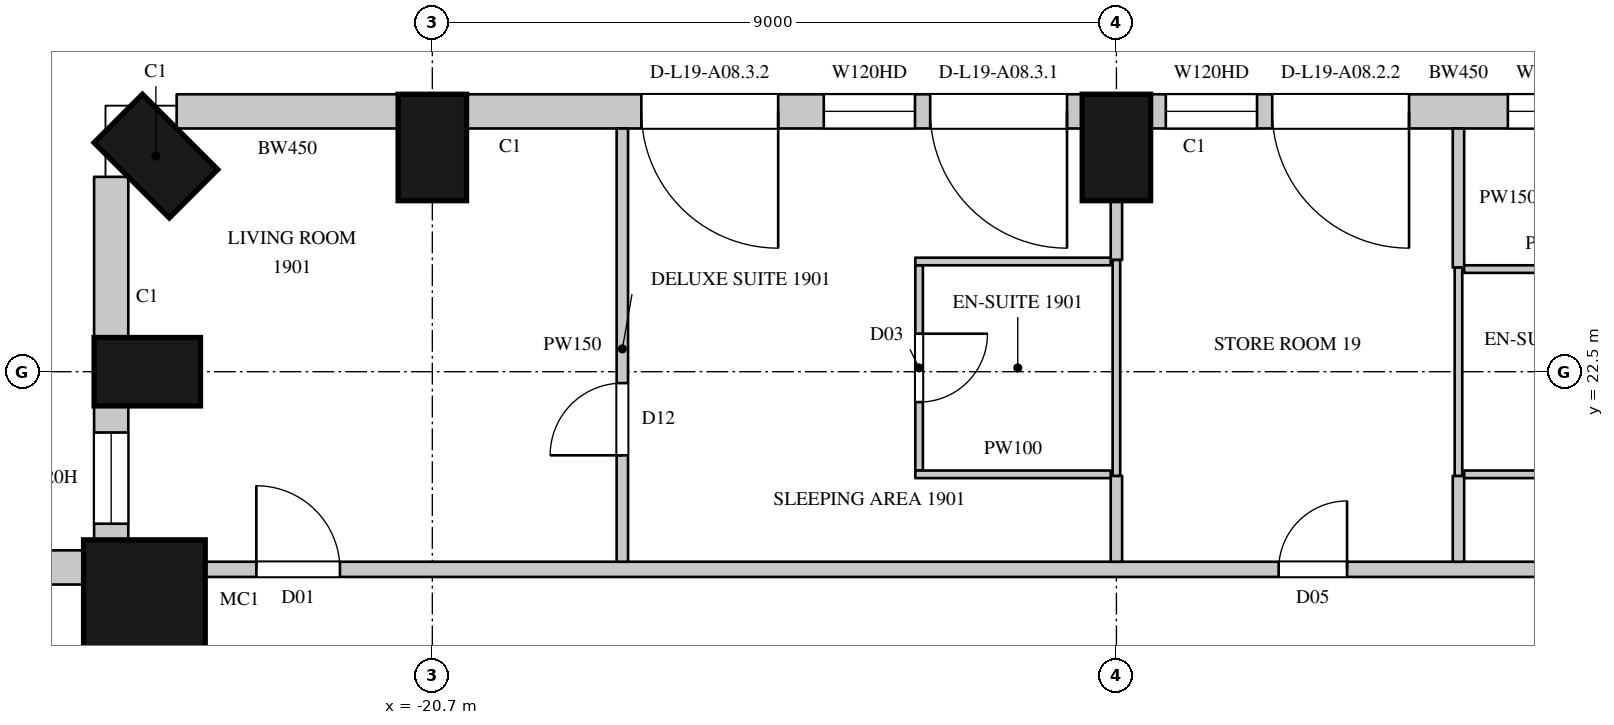
"""IFC4 building model, lengths in metres.
Left out: names, types, materials, properties, quantities, classifications, styles, units other than length and angle.
Written with IfcOpenShell. Run it as: python <this file> out.ifc"""

import sys

from ifc_helpers import new_model, si_unit, direction, frame, frame_2d, origin, origin_2d, place, context, subcontext, project, spatial, rectangle, circle, extrude, element, fill, save


model = new_model("IFC4")
c1 = context("Model", 3, precision=1e-05, world=origin(), true_north=direction((0.0, 1.0)))
c2 = subcontext(c1, "Body", "Model", "MODEL_VIEW")
j1 = project(units=[si_unit("LENGTHUNIT", "METRE"), si_unit("PLANEANGLEUNIT", "RADIAN")], contexts=[c1])
p1 = place(None, origin())
s1 = spatial("IfcSite", under=j1, at=p1, CompositionType="ELEMENT")
p2 = place(p1, origin())
s2 = spatial("IfcBuilding", under=s1, at=p2, CompositionType="ELEMENT")
p3 = place(p2, frame((0.0, 0.0, 98.7)))
s3 = spatial("IfcBuildingStorey", under=s2, at=p3, CompositionType="ELEMENT", Elevation=98.7)
for number, where, z_axis, x_axis in (
    (1, (-11.7, 25.45, 0.0), (0.0, 0.0, 1.0), (-1.0, 0.0, 0.0)),
    (2, (-20.7, 25.45, 0.0), (0.0, 0.0, 1.0), (-1.0, 0.0, 0.0)),
    (3, (-24.337, 25.337, 0.0), (0.0, 0.0, 1.0), (-0.707, -0.707, 0.0)),
    (4, (-24.45, 22.5, 0.0), (0.0, 0.0, 1.0), (0.0, -1.0, 0.0)),
):
    element("IfcColumn", number, at=place(p3, frame(where, z_axis=z_axis, x_axis=x_axis)), inside=s3, PredefinedType="COLUMN", context=c2, shape_type="SweptSolid", body=[
        extrude(rectangle(XDim=0.9, YDim=1.4, at=origin_2d()), origin(), (0.0, 0.0, 1.0), 3.6),
    ])
p4 = place(p3, frame((-24.488, 19.488, 0.0), z_axis=(0.0, 0.0, 1.0), x_axis=(1.0, 0.0, 0.0)))
e5 = element("IfcColumn", 5, at=p4, inside=s3, PredefinedType="COLUMN", context=c2, shape_type="SweptSolid", body=[
    extrude(circle(Radius=0.8, at=origin_2d()), origin(), (0.0, 0.0, 1.0), 3.6),
])
p5 = place(p3, frame((-3.15, 25.925, 0.0), z_axis=(0.0, 0.0, 1.0), x_axis=(-1.0, 0.0, 0.0)))
e6 = element("IfcWall", 6, at=p5, inside=s3, PredefinedType="SOLIDWALL", context=c2, shape_type="SweptSolid", body=[
    extrude(rectangle(XDim=8.1, YDim=0.45, at=frame_2d((4.05, 0.0))), origin(), (0.0, 0.0, 1.0), 3.3),
])
p6 = place(p5, frame((0.2, 0.0, 0.0)))
e7 = element("IfcOpeningElement", 7, at=p6, cuts=e6, PredefinedType="OPENING", context=c2, shape_type="SweptSolid", body=[
    extrude(rectangle(XDim=1.8, YDim=2.4, at=frame_2d((0.9, 1.2))), frame((0.0, 0.235, 0.0), z_axis=(0.0, -1.0, 0.0), x_axis=(1.0, 0.0, 0.0)), (0.0, 0.0, 1.0), 0.47),
])
p7 = place(p5, frame((2.2, 0.0, 1.05)))
e8 = element("IfcOpeningElement", 8, at=p7, cuts=e6, PredefinedType="OPENING", context=c2, shape_type="SweptSolid", body=[
    extrude(rectangle(XDim=1.2, YDim=2.0, at=frame_2d((0.6, 1.0))), frame((0.0, 0.235, 0.0), z_axis=(0.0, -1.0, 0.0), x_axis=(1.0, 0.0, 0.0)), (0.0, 0.0, 1.0), 0.47),
])
p8 = place(p5, frame((4.7, 0.0, 0.0)))
e9 = element("IfcOpeningElement", 9, at=p8, cuts=e6, PredefinedType="OPENING", context=c2, shape_type="SweptSolid", body=[
    extrude(rectangle(XDim=1.8, YDim=2.4, at=frame_2d((0.9, 1.2))), frame((0.0, 0.235, 0.0), z_axis=(0.0, -1.0, 0.0), x_axis=(1.0, 0.0, 0.0)), (0.0, 0.0, 1.0), 0.47),
])
p9 = place(p5, frame((6.7, 0.0, 1.05)))
e10 = element("IfcOpeningElement", 10, at=p9, cuts=e6, PredefinedType="OPENING", context=c2, shape_type="SweptSolid", body=[
    extrude(rectangle(XDim=1.2, YDim=2.0, at=frame_2d((0.6, 1.0))), frame((0.0, 0.235, 0.0), z_axis=(0.0, -1.0, 0.0), x_axis=(1.0, 0.0, 0.0)), (0.0, 0.0, 1.0), 0.47),
])
p10 = place(p3, frame((-12.15, 25.925, 0.0), z_axis=(0.0, 0.0, 1.0), x_axis=(-1.0, 0.0, 0.0)))
e11 = element("IfcWall", 11, at=p10, inside=s3, PredefinedType="SOLIDWALL", context=c2, shape_type="SweptSolid", body=[
    extrude(rectangle(XDim=8.1, YDim=0.45, at=frame_2d((4.05, 0.0))), origin(), (0.0, 0.0, 1.0), 3.3),
])
p11 = place(p10, frame((0.2, 0.0, 0.0)))
e12 = element("IfcOpeningElement", 12, at=p11, cuts=e11, PredefinedType="OPENING", context=c2, shape_type="SweptSolid", body=[
    extrude(rectangle(XDim=1.8, YDim=2.4, at=frame_2d((0.9, 1.2))), frame((0.0, 0.235, 0.0), z_axis=(0.0, -1.0, 0.0), x_axis=(1.0, 0.0, 0.0)), (0.0, 0.0, 1.0), 0.47),
])
p12 = place(p10, frame((2.2, 0.0, 1.05)))
e13 = element("IfcOpeningElement", 13, at=p12, cuts=e11, PredefinedType="OPENING", context=c2, shape_type="SweptSolid", body=[
    extrude(rectangle(XDim=1.2, YDim=2.0, at=frame_2d((0.6, 1.0))), frame((0.0, 0.235, 0.0), z_axis=(0.0, -1.0, 0.0), x_axis=(1.0, 0.0, 0.0)), (0.0, 0.0, 1.0), 0.47),
])
p13 = place(p10, frame((4.0, 0.0, 0.0)))
e14 = element("IfcOpeningElement", 14, at=p13, cuts=e11, PredefinedType="OPENING", context=c2, shape_type="SweptSolid", body=[
    extrude(rectangle(XDim=1.8, YDim=2.4, at=frame_2d((0.9, 1.2))), frame((0.0, 0.235, 0.0), z_axis=(0.0, -1.0, 0.0), x_axis=(1.0, 0.0, 0.0)), (0.0, 0.0, 1.0), 0.47),
])
p14 = place(p3, frame((-21.15, 25.925, 0.0), z_axis=(0.0, 0.0, 1.0), x_axis=(-1.0, 0.0, 0.0)))
e15 = element("IfcWall", 15, at=p14, inside=s3, PredefinedType="SOLIDWALL", context=c2, shape_type="SweptSolid", body=[
    extrude(rectangle(XDim=2.914, YDim=0.45, at=frame_2d((1.457, 0.0))), origin(), (0.0, 0.0, 1.0), 3.3),
])
p15 = place(p3, frame((-24.925, 25.064, 0.0), z_axis=(0.0, 0.0, 1.0), x_axis=(0.0, -1.0, 0.0)))
e16 = element("IfcWall", 16, at=p15, inside=s3, PredefinedType="SOLIDWALL", context=c2, shape_type="SweptSolid", body=[
    extrude(rectangle(XDim=2.114, YDim=0.45, at=frame_2d((1.057, 0.0))), origin(), (0.0, 0.0, 1.0), 3.3),
])
p16 = place(p3, frame((-24.925, 22.05, 0.0), z_axis=(0.0, 0.0, 1.0), x_axis=(0.0, -1.0, 0.0)))
e17 = element("IfcWall", 17, at=p16, inside=s3, PredefinedType="SOLIDWALL", context=c2, shape_type="SweptSolid", body=[
    extrude(rectangle(XDim=1.792, YDim=0.45, at=frame_2d((0.896, 0.0))), origin(), (0.0, 0.0, 1.0), 3.3),
])
p17 = place(p16, frame((0.35, 0.0, 1.05)))
e18 = element("IfcOpeningElement", 18, at=p17, cuts=e17, PredefinedType="OPENING", context=c2, shape_type="SweptSolid", body=[
    extrude(rectangle(XDim=1.2, YDim=2.0, at=frame_2d((0.6, 1.0))), frame((0.0, 0.235, 0.0), z_axis=(0.0, -1.0, 0.0), x_axis=(1.0, 0.0, 0.0)), (0.0, 0.0, 1.0), 0.47),
])
p18 = place(p3, frame((-25.259, 19.925, 0.0), z_axis=(0.0, 0.0, 1.0), x_axis=(-1.0, 0.0, 0.0)))
e19 = element("IfcWall", 19, at=p18, inside=s3, PredefinedType="SOLIDWALL", context=c2, shape_type="SweptSolid", body=[
    extrude(rectangle(XDim=3.805, YDim=0.45, at=frame_2d((1.903, 0.0))), origin(), (0.0, 0.0, 1.0), 3.3),
])
p19 = place(p18, frame((0.592, 0.0, 1.05)))
e20 = element("IfcOpeningElement", 20, at=p19, cuts=e19, PredefinedType="OPENING", context=c2, shape_type="SweptSolid", body=[
    extrude(rectangle(XDim=2.7, YDim=2.0, at=frame_2d((1.35, 1.0))), frame((0.0, 0.235, 0.0), z_axis=(0.0, -1.0, 0.0), x_axis=(1.0, 0.0, 0.0)), (0.0, 0.0, 1.0), 0.47),
])
p20 = place(p3, frame((-23.765, 19.9, 0.0), z_axis=(0.0, 0.0, 1.0), x_axis=(1.0, 0.0, 0.0)))
e21 = element("IfcWall", 21, at=p20, inside=s3, PredefinedType="PARTITIONING", context=c2, shape_type="SweptSolid", body=[
    extrude(rectangle(XDim=41.549, YDim=0.2, at=frame_2d((20.774, 0.0))), origin(), (0.0, 0.0, 1.0), 3.3),
])
p21 = place(p20, frame((14.2, 0.0, 0.0)))
e22 = element("IfcOpeningElement", 22, at=p21, cuts=e21, PredefinedType="OPENING", context=c2, shape_type="SweptSolid", body=[
    extrude(rectangle(XDim=0.9, YDim=2.2, at=frame_2d((0.45, 1.1))), frame((0.0, 0.11, 0.0), z_axis=(0.0, -1.0, 0.0), x_axis=(1.0, 0.0, 0.0)), (0.0, 0.0, 1.0), 0.22),
])
p22 = place(p20, frame((27.05, 0.0, 0.0)))
e23 = element("IfcOpeningElement", 23, at=p22, cuts=e21, PredefinedType="OPENING", context=c2, shape_type="SweptSolid", body=[
    extrude(rectangle(XDim=0.9, YDim=2.2, at=frame_2d((0.45, 1.1))), frame((0.0, 0.11, 0.0), z_axis=(0.0, -1.0, 0.0), x_axis=(1.0, 0.0, 0.0)), (0.0, 0.0, 1.0), 0.22),
])
p23 = place(p20, frame((0.75, 0.0, 0.0)))
e24 = element("IfcOpeningElement", 24, at=p23, cuts=e21, PredefinedType="OPENING", context=c2, shape_type="SweptSolid", body=[
    extrude(rectangle(XDim=1.1, YDim=2.4, at=frame_2d((0.55, 1.2))), frame((0.0, 0.11, 0.0), z_axis=(0.0, -1.0, 0.0), x_axis=(1.0, 0.0, 0.0)), (0.0, 0.0, 1.0), 0.22),
])
p24 = place(p20, frame((23.15, 0.0, 0.0)))
e25 = element("IfcOpeningElement", 25, at=p24, cuts=e21, PredefinedType="OPENING", context=c2, shape_type="SweptSolid", body=[
    extrude(rectangle(XDim=0.95, YDim=2.2, at=frame_2d((0.475, 1.1))), frame((0.0, 0.11, 0.0), z_axis=(0.0, -1.0, 0.0), x_axis=(1.0, 0.0, 0.0)), (0.0, 0.0, 1.0), 0.22),
])
p25 = place(p20, frame((34.95, 0.0, 0.0)))
e26 = element("IfcOpeningElement", 26, at=p25, cuts=e21, PredefinedType="OPENING", context=c2, shape_type="SweptSolid", body=[
    extrude(rectangle(XDim=0.95, YDim=2.2, at=frame_2d((0.475, 1.1))), frame((0.0, 0.11, 0.0), z_axis=(0.0, -1.0, 0.0), x_axis=(1.0, 0.0, 0.0)), (0.0, 0.0, 1.0), 0.22),
])
p26 = place(p3, frame((-18.2, 20.0, 0.0), z_axis=(0.0, 0.0, 1.0), x_axis=(0.0, 1.0, 0.0)))
e27 = element("IfcWall", 27, at=p26, inside=s3, PredefinedType="PARTITIONING", context=c2, shape_type="SweptSolid", body=[
    extrude(rectangle(XDim=5.7, YDim=0.15, at=frame_2d((2.85, 0.0))), origin(), (0.0, 0.0, 1.0), 3.3),
])
p27 = place(p26, frame((1.4, 0.0, 0.0)))
e28 = element("IfcOpeningElement", 28, at=p27, cuts=e27, PredefinedType="OPENING", context=c2, shape_type="SweptSolid", body=[
    extrude(rectangle(XDim=0.95, YDim=2.2, at=frame_2d((0.475, 1.1))), frame((0.0, 0.085, 0.0), z_axis=(0.0, -1.0, 0.0), x_axis=(1.0, 0.0, 0.0)), (0.0, 0.0, 1.0), 0.17),
])
p28 = place(p3, frame((-11.7, 20.0, 0.0), z_axis=(0.0, 0.0, 1.0), x_axis=(0.0, 1.0, 0.0)))
e29 = element("IfcWall", 29, at=p28, inside=s3, PredefinedType="PARTITIONING", context=c2, shape_type="SweptSolid", body=[
    extrude(rectangle(XDim=1.13, YDim=0.15, at=frame_2d((0.565, 0.0))), origin(), (0.0, 0.0, 1.0), 2.75),
])
p29 = place(p3, frame((-11.7, 23.97, 0.0), z_axis=(0.0, 0.0, 1.0), x_axis=(0.0, 1.0, 0.0)))
e30 = element("IfcWall", 30, at=p29, inside=s3, PredefinedType="PARTITIONING", context=c2, shape_type="SweptSolid", body=[
    extrude(rectangle(XDim=0.78, YDim=0.15, at=frame_2d((0.39, 0.0))), origin(), (0.0, 0.0, 1.0), 2.75),
])
p30 = place(p3, frame((-7.2, 20.0, 0.0), z_axis=(0.0, 0.0, 1.0), x_axis=(0.0, 1.0, 0.0)))
e31 = element("IfcWall", 31, at=p30, inside=s3, PredefinedType="PARTITIONING", context=c2, shape_type="SweptSolid", body=[
    extrude(rectangle(XDim=1.13, YDim=0.15, at=frame_2d((0.565, 0.0))), origin(), (0.0, 0.0, 1.0), 2.65),
])
p31 = place(p3, frame((-7.2, 23.87, 0.0), z_axis=(0.0, 0.0, 1.0), x_axis=(0.0, 1.0, 0.0)))
e32 = element("IfcWall", 32, at=p31, inside=s3, PredefinedType="PARTITIONING", context=c2, shape_type="SweptSolid", body=[
    extrude(rectangle(XDim=1.83, YDim=0.15, at=frame_2d((0.915, 0.0))), origin(), (0.0, 0.0, 1.0), 2.65),
])
p32 = place(p3, frame((-14.296, 21.2, 0.0), z_axis=(0.0, 0.0, 1.0), x_axis=(0.0, 1.0, 0.0)))
e33 = element("IfcWall", 33, at=p32, inside=s3, PredefinedType="PARTITIONING", context=c2, shape_type="SweptSolid", body=[
    extrude(rectangle(XDim=2.7, YDim=0.1, at=frame_2d((1.35, 0.0))), origin(), (0.0, 0.0, 1.0), 3.3),
])
p33 = place(p32, frame((0.9, 0.0, 0.0)))
e34 = element("IfcOpeningElement", 34, at=p33, cuts=e33, PredefinedType="OPENING", context=c2, shape_type="SweptSolid", body=[
    extrude(rectangle(XDim=0.9, YDim=2.2, at=frame_2d((0.45, 1.1))), frame((0.0, 0.06, 0.0), z_axis=(0.0, -1.0, 0.0), x_axis=(1.0, 0.0, 0.0)), (0.0, 0.0, 1.0), 0.12),
])
for number, where, z_axis, x_axis in (
    (35, (-14.346, 21.15, 0.0), (0.0, 0.0, 1.0), (1.0, 0.0, 0.0)),
    (36, (-14.346, 23.95, 0.0), (0.0, 0.0, 1.0), (1.0, 0.0, 0.0)),
):
    element("IfcWall", number, at=place(p3, frame(where, z_axis=z_axis, x_axis=x_axis)), inside=s3, PredefinedType="PARTITIONING", context=c2, shape_type="SweptSolid", body=[
        extrude(rectangle(XDim=2.571, YDim=0.1, at=frame_2d((1.286, 0.0))), origin(), (0.0, 0.0, 1.0), 3.3),
    ])
p34 = place(p3, frame((-11.7, 21.13, 0.0), z_axis=(0.0, 0.0, 1.0), x_axis=(0.0, 1.0, 0.0)))
e37 = element("IfcWall", 37, at=p34, inside=s3, PredefinedType="PARTITIONING", context=c2, shape_type="SweptSolid", body=[
    extrude(rectangle(XDim=2.84, YDim=0.1, at=frame_2d((1.42, 0.0))), origin(), (0.0, 0.0, 1.0), 2.75),
])
p35 = place(p3, frame((-7.2, 21.13, 0.0), z_axis=(0.0, 0.0, 1.0), x_axis=(0.0, 1.0, 0.0)))
e38 = element("IfcWall", 38, at=p35, inside=s3, PredefinedType="PARTITIONING", context=c2, shape_type="SweptSolid", body=[
    extrude(rectangle(XDim=2.74, YDim=0.1, at=frame_2d((1.37, 0.0))), origin(), (0.0, 0.0, 1.0), 2.65),
])
p36 = place(p3, frame((-7.125, 21.15, 0.0), z_axis=(0.0, 0.0, 1.0), x_axis=(1.0, 0.0, 0.0)))
e39 = element("IfcWall", 39, at=p36, inside=s3, PredefinedType="PARTITIONING", context=c2, shape_type="SweptSolid", body=[
    extrude(rectangle(XDim=2.371, YDim=0.1, at=frame_2d((1.186, 0.0))), origin(), (0.0, 0.0, 1.0), 3.3),
])
p37 = place(p36, frame((1.25, 0.0, 0.0)))
e40 = element("IfcOpeningElement", 40, at=p37, cuts=e39, PredefinedType="OPENING", context=c2, shape_type="SweptSolid", body=[
    extrude(rectangle(XDim=0.9, YDim=2.2, at=frame_2d((0.45, 1.1))), frame((0.0, 0.06, 0.0), z_axis=(0.0, -1.0, 0.0), x_axis=(1.0, 0.0, 0.0)), (0.0, 0.0, 1.0), 0.12),
])
p38 = place(p3, frame((-7.125, 23.85, 0.0), z_axis=(0.0, 0.0, 1.0), x_axis=(1.0, 0.0, 0.0)))
e41 = element("IfcWall", 41, at=p38, inside=s3, PredefinedType="PARTITIONING", context=c2, shape_type="SweptSolid", body=[
    extrude(rectangle(XDim=2.371, YDim=0.1, at=frame_2d((1.186, 0.0))), origin(), (0.0, 0.0, 1.0), 3.3),
])
p39 = place(p7, origin())
e42 = element("IfcWindow", 42, at=p39, inside=s3, PartitioningType="SINGLE_PANEL", PredefinedType="WINDOW", context=c2, shape_type="SweptSolid", body=[
    extrude(rectangle(XDim=1.2, YDim=2.0, at=frame_2d((0.6, 1.0))), frame((0.0, 0.135, 0.0), z_axis=(0.0, -1.0, 0.0), x_axis=(1.0, 0.0, 0.0)), (0.0, 0.0, 1.0), 0.06),
])
fill(e8, e42)
p40 = place(p8, origin())
e43 = element("IfcDoor", 43, at=p40, inside=s3, OperationType="SLIDING_TO_LEFT", PredefinedType="DOOR", context=c2, shape_type="SweptSolid", body=[
    extrude(rectangle(XDim=1.8, YDim=2.4, at=frame_2d((0.9, 1.2))), frame((0.0, 0.13, 0.0), z_axis=(0.0, -1.0, 0.0), x_axis=(1.0, 0.0, 0.0)), (0.0, 0.0, 1.0), 0.05),
])
fill(e9, e43)
p41 = place(p9, origin())
e44 = element("IfcWindow", 44, at=p41, inside=s3, PartitioningType="SINGLE_PANEL", PredefinedType="WINDOW", context=c2, shape_type="SweptSolid", body=[
    extrude(rectangle(XDim=1.2, YDim=2.0, at=frame_2d((0.6, 1.0))), frame((0.0, 0.135, 0.0), z_axis=(0.0, -1.0, 0.0), x_axis=(1.0, 0.0, 0.0)), (0.0, 0.0, 1.0), 0.06),
])
fill(e10, e44)
p42 = place(p11, origin())
e45 = element("IfcDoor", 45, at=p42, inside=s3, OperationType="SLIDING_TO_LEFT", PredefinedType="DOOR", context=c2, shape_type="SweptSolid", body=[
    extrude(rectangle(XDim=1.8, YDim=2.4, at=frame_2d((0.9, 1.2))), frame((0.0, 0.13, 0.0), z_axis=(0.0, -1.0, 0.0), x_axis=(1.0, 0.0, 0.0)), (0.0, 0.0, 1.0), 0.05),
])
fill(e12, e45)
p43 = place(p12, origin())
e46 = element("IfcWindow", 46, at=p43, inside=s3, PartitioningType="SINGLE_PANEL", PredefinedType="WINDOW", context=c2, shape_type="SweptSolid", body=[
    extrude(rectangle(XDim=1.2, YDim=2.0, at=frame_2d((0.6, 1.0))), frame((0.0, 0.135, 0.0), z_axis=(0.0, -1.0, 0.0), x_axis=(1.0, 0.0, 0.0)), (0.0, 0.0, 1.0), 0.06),
])
fill(e13, e46)
p44 = place(p13, origin())
e47 = element("IfcDoor", 47, at=p44, inside=s3, OperationType="SLIDING_TO_LEFT", PredefinedType="DOOR", context=c2, shape_type="SweptSolid", body=[
    extrude(rectangle(XDim=1.8, YDim=2.4, at=frame_2d((0.9, 1.2))), frame((0.0, 0.13, 0.0), z_axis=(0.0, -1.0, 0.0), x_axis=(1.0, 0.0, 0.0)), (0.0, 0.0, 1.0), 0.05),
])
fill(e14, e47)
p45 = place(p17, origin())
e48 = element("IfcWindow", 48, at=p45, inside=s3, PartitioningType="SINGLE_PANEL", PredefinedType="WINDOW", context=c2, shape_type="SweptSolid", body=[
    extrude(rectangle(XDim=1.2, YDim=2.0, at=frame_2d((0.6, 1.0))), frame((0.0, 0.135, 0.0), z_axis=(0.0, -1.0, 0.0), x_axis=(1.0, 0.0, 0.0)), (0.0, 0.0, 1.0), 0.06),
])
fill(e18, e48)
p46 = place(p21, origin())
e49 = element("IfcDoor", 49, at=p46, inside=s3, OperationType="SINGLE_SWING_RIGHT", PredefinedType="DOOR", context=c2, shape_type="SweptSolid", body=[
    extrude(rectangle(XDim=0.9, YDim=2.2, at=frame_2d((0.45, 1.1))), frame((0.0, 0.025, 0.0), z_axis=(0.0, -1.0, 0.0), x_axis=(1.0, 0.0, 0.0)), (0.0, 0.0, 1.0), 0.05),
])
fill(e22, e49)
p47 = place(p23, origin())
e50 = element("IfcDoor", 50, at=p47, inside=s3, OperationType="SINGLE_SWING_LEFT", PredefinedType="DOOR", context=c2, shape_type="SweptSolid", body=[
    extrude(rectangle(XDim=1.1, YDim=2.4, at=frame_2d((0.55, 1.2))), frame((0.0, 0.025, 0.0), z_axis=(0.0, -1.0, 0.0), x_axis=(1.0, 0.0, 0.0)), (0.0, 0.0, 1.0), 0.05),
])
fill(e24, e50)
p48 = place(p27, origin())
e51 = element("IfcDoor", 51, at=p48, inside=s3, OperationType="SINGLE_SWING_LEFT", PredefinedType="DOOR", context=c2, shape_type="SweptSolid", body=[
    extrude(rectangle(XDim=0.95, YDim=2.2, at=frame_2d((0.475, 1.1))), frame((0.0, 0.025, 0.0), z_axis=(0.0, -1.0, 0.0), x_axis=(1.0, 0.0, 0.0)), (0.0, 0.0, 1.0), 0.05),
])
fill(e28, e51)
p49 = place(p33, origin())
e52 = element("IfcDoor", 52, at=p49, inside=s3, OperationType="SINGLE_SWING_LEFT", PredefinedType="DOOR", context=c2, shape_type="SweptSolid", body=[
    extrude(rectangle(XDim=0.9, YDim=2.2, at=frame_2d((0.45, 1.1))), frame((0.0, 0.025, 0.0), z_axis=(0.0, -1.0, 0.0), x_axis=(1.0, 0.0, 0.0)), (0.0, 0.0, 1.0), 0.05),
])
fill(e34, e52)
save(model, sys.argv[1])
